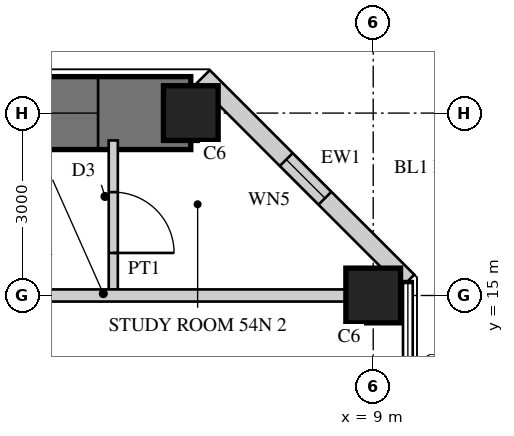
"""IFC4 building model, lengths in metres.
Left out: names, types, materials, properties, quantities, classifications, styles, units other than length and angle.
Written with IfcOpenShell. Run it as: python <this file> out.ifc"""

import sys

from ifc_helpers import new_model, si_unit, direction, frame, frame_2d, origin, origin_2d, place, context, subcontext, project, spatial, rectangle, hollow_rectangle, extrude, element, fill, save


model = new_model("IFC4")
c1 = context("Model", 3, precision=1e-05, world=origin(), true_north=direction((0.0, 1.0)))
c2 = subcontext(c1, "Body", "Model", "MODEL_VIEW")
j1 = project(units=[si_unit("LENGTHUNIT", "METRE"), si_unit("PLANEANGLEUNIT", "RADIAN")], contexts=[c1])
p1 = place(None, origin())
s1 = spatial("IfcSite", under=j1, at=p1, CompositionType="ELEMENT")
p2 = place(p1, origin())
s2 = spatial("IfcBuilding", under=s1, at=p2, CompositionType="ELEMENT")
p3 = place(p2, frame((0.0, 0.0, 213.7)))
s3 = spatial("IfcBuildingStorey", under=s2, at=p3, CompositionType="ELEMENT", Elevation=213.7)
p4 = place(p3, frame((6.0, 18.0, 0.0), z_axis=(0.0, 0.0, 1.0), x_axis=(-1.0, 0.0, 0.0)))
e1 = element("IfcWall", 1, at=p4, inside=s3, PredefinedType="SHEAR", context=c2, shape_type="SweptSolid", body=[
    extrude(rectangle(XDim=12.0, YDim=1.2, at=frame_2d((6.0, 0.0))), origin(), (0.0, 0.0, 1.0), 3.4),
])
p5 = place(p4, frame((1.525, 0.0, 0.6)))
e2 = element("IfcOpeningElement", 2, at=p5, cuts=e1, PredefinedType="OPENING", context=c2, shape_type="SweptSolid", body=[
    extrude(rectangle(XDim=3.0, YDim=2.4, at=frame_2d((1.5, 1.2))), frame((0.0, 0.61, 0.0), z_axis=(0.0, -1.0, 0.0), x_axis=(1.0, 0.0, 0.0)), (0.0, 0.0, 1.0), 1.22),
])
p6 = place(p4, frame((7.475, 0.0, 0.6)))
e3 = element("IfcOpeningElement", 3, at=p6, cuts=e1, PredefinedType="OPENING", context=c2, shape_type="SweptSolid", body=[
    extrude(rectangle(XDim=3.0, YDim=2.4, at=frame_2d((1.5, 1.2))), frame((0.0, 0.61, 0.0), z_axis=(0.0, -1.0, 0.0), x_axis=(1.0, 0.0, 0.0)), (0.0, 0.0, 1.0), 1.22),
])
for number, where, z_axis, x_axis in (
    (4, (9.0, 15.0, 0.0), (0.0, 0.0, 1.0), (1.0, 0.0, 0.0)),
    (5, (6.0, 18.0, 0.0), (0.0, 0.0, 1.0), (1.0, 0.0, 0.0)),
):
    element("IfcColumn", number, at=place(p3, frame(where, z_axis=z_axis, x_axis=x_axis)), inside=s3, PredefinedType="COLUMN", context=c2, shape_type="SweptSolid", body=[
        extrude(rectangle(XDim=0.9, YDim=0.9, at=origin_2d()), origin(), (0.0, 0.0, 1.0), 3.4),
    ])
p7 = place(p3, frame((9.57, 15.236, 0.0), z_axis=(0.0, 0.0, 1.0), x_axis=(-0.707106781187, 0.707106781187, 0.0)))
e6 = element("IfcWall", 6, at=p7, inside=s3, PredefinedType="SOLIDWALL", context=c2, shape_type="SweptSolid", body=[
    extrude(rectangle(XDim=4.757, YDim=0.3, at=frame_2d((2.379, 0.0))), origin(), (0.0, 0.0, 1.0), 3.15),
])
p8 = place(p7, frame((1.929, 0.0, 0.3)))
e7 = element("IfcOpeningElement", 7, at=p8, cuts=e6, PredefinedType="OPENING", context=c2, shape_type="SweptSolid", body=[
    extrude(rectangle(XDim=0.9, YDim=2.4, at=frame_2d((0.45, 1.2))), frame((0.0, 0.16, 0.0), z_axis=(0.0, -1.0, 0.0), x_axis=(1.0, 0.0, 0.0)), (0.0, 0.0, 1.0), 0.32),
])
p9 = place(p3, frame((4.725, 15.1, 0.0), z_axis=(0.0, 0.0, 1.0), x_axis=(0.0, 1.0, 0.0)))
e8 = element("IfcWall", 8, at=p9, inside=s3, PredefinedType="PARTITIONING", context=c2, shape_type="SweptSolid", body=[
    extrude(rectangle(XDim=2.45, YDim=0.15, at=frame_2d((1.225, 0.0))), origin(), (0.0, 0.0, 1.0), 3.15),
])
p10 = place(p9, frame((0.6, 0.0, 0.0)))
e9 = element("IfcOpeningElement", 9, at=p10, cuts=e8, PredefinedType="OPENING", context=c2, shape_type="SweptSolid", body=[
    extrude(rectangle(XDim=1.0, YDim=2.1, at=frame_2d((0.5, 1.05))), frame((0.0, 0.085, 0.0), z_axis=(0.0, -1.0, 0.0), x_axis=(1.0, 0.0, 0.0)), (0.0, 0.0, 1.0), 0.17),
])
p11 = place(p3, frame((8.55, 15.0, 0.0), z_axis=(0.0, 0.0, 1.0), x_axis=(-1.0, 0.0, 0.0)))
e10 = element("IfcWall", 10, at=p11, inside=s3, PredefinedType="SOLIDWALL", context=c2, shape_type="SweptSolid", body=[
    extrude(rectangle(XDim=7.95, YDim=0.2, at=frame_2d((3.975, 0.0))), origin(), (0.0, 0.0, 1.0), 2.1),
])
p12 = place(p8, origin())
e11 = element("IfcWindow", 11, at=p12, inside=s3, PartitioningType="SINGLE_PANEL", PredefinedType="WINDOW", context=c2, shape_type="SweptSolid", body=[
    extrude(hollow_rectangle(XDim=0.9, YDim=2.4, WallThickness=0.06, at=frame_2d((0.45, 1.2))), frame((0.0, 0.03, 0.0), z_axis=(0.0, -1.0, 0.0), x_axis=(1.0, 0.0, 0.0)), (0.0, 0.0, 1.0), 0.06),
    extrude(rectangle(XDim=0.779, YDim=2.279, at=frame_2d((0.45, 1.2))), frame((0.0, 0.03, 0.0), z_axis=(0.0, -1.0, 0.0), x_axis=(1.0, 0.0, 0.0)), (0.0, 0.0, 1.0), 0.06),
])
fill(e7, e11)
p13 = place(p5, origin())
e12 = element("IfcWindow", 12, at=p13, inside=s3, PartitioningType="SINGLE_PANEL", PredefinedType="WINDOW", context=c2, shape_type="SweptSolid", body=[
    extrude(hollow_rectangle(XDim=3.0, YDim=2.4, WallThickness=0.06, at=frame_2d((1.5, 1.2))), frame((0.0, 0.03, 0.0), z_axis=(0.0, -1.0, 0.0), x_axis=(1.0, 0.0, 0.0)), (0.0, 0.0, 1.0), 0.06),
    extrude(rectangle(XDim=2.879, YDim=2.279, at=frame_2d((1.5, 1.2))), frame((0.0, 0.03, 0.0), z_axis=(0.0, -1.0, 0.0), x_axis=(1.0, 0.0, 0.0)), (0.0, 0.0, 1.0), 0.06),
])
fill(e2, e12)
p14 = place(p10, frame((1.0, 0.0, 0.0), z_axis=(0.0, 0.0, 1.0), x_axis=(-1.0, 0.0, 0.0)))
e13 = element("IfcDoor", 13, at=p14, inside=s3, OperationType="SINGLE_SWING_RIGHT", PredefinedType="DOOR", context=c2, shape_type="SweptSolid", body=[
    extrude(rectangle(XDim=1.0, YDim=2.1, at=frame_2d((0.5, 1.05))), frame((0.0, 0.025, 0.0), z_axis=(0.0, -1.0, 0.0), x_axis=(1.0, 0.0, 0.0)), (0.0, 0.0, 1.0), 0.05),
])
fill(e9, e13)
save(model, sys.argv[1])
